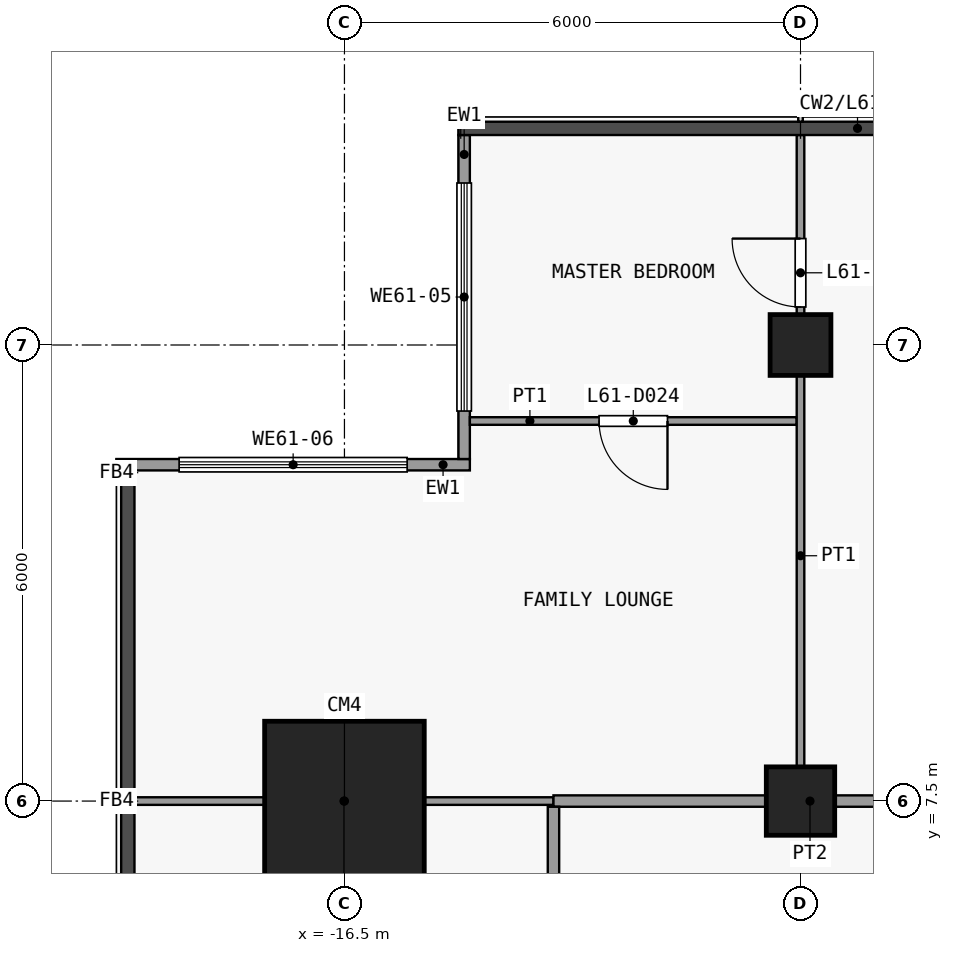
"""IFC4 building model, lengths in metres.
Left out: names, types, materials, properties, quantities, classifications, styles, units other than length and angle.
Written with IfcOpenShell. Run it as: python <this file> out.ifc"""

import sys

from ifc_helpers import new_model, si_unit, direction, frame, frame_2d, origin, origin_2d, place, context, subcontext, project, spatial, rectangle, extrude, element, fill, save


model = new_model("IFC4")
c1 = context("Model", 3, precision=1e-05, world=origin(), true_north=direction((0.0, 1.0)))
c2 = subcontext(c1, "Body", "Model", "MODEL_VIEW")
j1 = project(units=[si_unit("LENGTHUNIT", "METRE"), si_unit("PLANEANGLEUNIT", "RADIAN")], contexts=[c1])
p1 = place(None, origin())
s1 = spatial("IfcSite", under=j1, at=p1, CompositionType="ELEMENT")
p2 = place(p1, origin())
s2 = spatial("IfcBuilding", under=s1, at=p2, CompositionType="ELEMENT")
p3 = place(p2, frame((0.0, 0.0, 241.1)))
s3 = spatial("IfcBuildingStorey", under=s2, at=p3, CompositionType="ELEMENT", Elevation=241.1)
p4 = place(p3, frame((-16.5, 7.5, 0.0), z_axis=(0.0, 0.0, 1.0), x_axis=(1.0, 0.0, 0.0)))
e1 = element("IfcColumn", 1, at=p4, inside=s3, PredefinedType="COLUMN", context=c2, shape_type="SweptSolid", body=[
    extrude(rectangle(XDim=2.1, YDim=2.1, at=origin_2d()), origin(), (0.0, 0.0, 1.0), 3.6),
])
p5 = place(p3, frame((-10.5, 7.5, 0.0), z_axis=(0.0, 0.0, 1.0), x_axis=(1.0, 0.0, 0.0)))
e2 = element("IfcColumn", 2, at=p5, inside=s3, PredefinedType="COLUMN", context=c2, shape_type="SweptSolid", body=[
    extrude(rectangle(XDim=0.9, YDim=0.9, at=origin_2d()), origin(), (0.0, 0.0, 1.0), 3.6),
])
p6 = place(p3, frame((-10.5, 13.5, 0.0), z_axis=(0.0, 0.0, 1.0), x_axis=(1.0, 0.0, 0.0)))
e3 = element("IfcColumn", 3, at=p6, inside=s3, PredefinedType="COLUMN", context=c2, shape_type="SweptSolid", body=[
    extrude(rectangle(XDim=0.8, YDim=0.8, at=origin_2d()), origin(), (0.0, 0.0, 1.0), 3.6),
])
p7 = place(p3, frame((-14.925, 12.0, 0.0), z_axis=(0.0, 0.0, 1.0), x_axis=(0.0, 1.0, 0.0)))
e4 = element("IfcWall", 4, at=p7, inside=s3, PredefinedType="SOLIDWALL", context=c2, shape_type="SweptSolid", body=[
    extrude(rectangle(XDim=4.262, YDim=0.15, at=frame_2d((2.131, 0.0))), origin(), (0.0, 0.0, 1.0), 3.3),
])
p8 = place(p7, frame((0.631, 0.0, 0.9)))
e5 = element("IfcOpeningElement", 5, at=p8, cuts=e4, PredefinedType="OPENING", context=c2, shape_type="SweptSolid", body=[
    extrude(rectangle(XDim=3.0, YDim=2.4, at=frame_2d((1.5, 1.2))), frame((0.0, 0.085, 0.0), z_axis=(0.0, -1.0, 0.0), x_axis=(1.0, 0.0, 0.0)), (0.0, 0.0, 1.0), 0.17),
])
p9 = place(p3, frame((-19.5, 11.925, 0.0), z_axis=(0.0, 0.0, 1.0), x_axis=(1.0, 0.0, 0.0)))
e6 = element("IfcWall", 6, at=p9, inside=s3, PredefinedType="SOLIDWALL", context=c2, shape_type="SweptSolid", body=[
    extrude(rectangle(XDim=4.65, YDim=0.15, at=frame_2d((2.325, 0.0))), origin(), (0.0, 0.0, 1.0), 3.3),
])
p10 = place(p9, frame((0.825, 0.0, 0.9)))
e7 = element("IfcOpeningElement", 7, at=p10, cuts=e6, PredefinedType="OPENING", context=c2, shape_type="SweptSolid", body=[
    extrude(rectangle(XDim=3.0, YDim=2.4, at=frame_2d((1.5, 1.2))), frame((0.0, 0.085, 0.0), z_axis=(0.0, -1.0, 0.0), x_axis=(1.0, 0.0, 0.0)), (0.0, 0.0, 1.0), 0.17),
])
p11 = place(p3, frame((-19.262, 7.5, 0.0), z_axis=(0.0, 0.0, 1.0), x_axis=(1.0, 0.0, 0.0)))
e8 = element("IfcWall", 8, at=p11, inside=s3, PredefinedType="PARTITIONING", context=c2, shape_type="SweptSolid", body=[
    extrude(rectangle(XDim=5.512, YDim=0.1, at=frame_2d((2.756, 0.0))), origin(), (0.0, 0.0, 1.0), 3.3),
])
p12 = place(p3, frame((-13.75, 7.5, 0.0), z_axis=(0.0, 0.0, 1.0), x_axis=(1.0, 0.0, 0.0)))
e9 = element("IfcWall", 9, at=p12, inside=s3, PredefinedType="PARTITIONING", context=c2, shape_type="SweptSolid", body=[
    extrude(rectangle(XDim=6.75, YDim=0.15, at=frame_2d((3.375, 0.0))), origin(), (0.0, 0.0, 1.0), 3.3),
])
p13 = place(p3, frame((-14.85, 12.5, 0.0), z_axis=(0.0, 0.0, 1.0), x_axis=(1.0, 0.0, 0.0)))
e10 = element("IfcWall", 10, at=p13, inside=s3, PredefinedType="PARTITIONING", context=c2, shape_type="SweptSolid", body=[
    extrude(rectangle(XDim=4.3, YDim=0.1, at=frame_2d((2.15, 0.0))), origin(), (0.0, 0.0, 1.0), 3.3),
])
p14 = place(p13, frame((1.7, 0.0, 0.0)))
e11 = element("IfcOpeningElement", 11, at=p14, cuts=e10, PredefinedType="OPENING", context=c2, shape_type="SweptSolid", body=[
    extrude(rectangle(XDim=0.9, YDim=2.1, at=frame_2d((0.45, 1.05))), frame((0.0, 0.06, 0.0), z_axis=(0.0, -1.0, 0.0), x_axis=(1.0, 0.0, 0.0)), (0.0, 0.0, 1.0), 0.12),
])
p15 = place(p3, frame((-13.75, 4.6, 0.0), z_axis=(0.0, 0.0, 1.0), x_axis=(0.0, 1.0, 0.0)))
e12 = element("IfcWall", 12, at=p15, inside=s3, PredefinedType="PARTITIONING", context=c2, shape_type="SweptSolid", body=[
    extrude(rectangle(XDim=2.825, YDim=0.15, at=frame_2d((1.413, 0.0))), origin(), (0.0, 0.0, 1.0), 3.3),
])
p16 = place(p15, frame((1.0, 0.0, 0.0)))
e13 = element("IfcOpeningElement", 13, at=p16, cuts=e12, PredefinedType="OPENING", context=c2, shape_type="SweptSolid", body=[
    extrude(rectangle(XDim=0.9, YDim=2.1, at=frame_2d((0.45, 1.05))), frame((0.0, 0.085, 0.0), z_axis=(0.0, -1.0, 0.0), x_axis=(1.0, 0.0, 0.0)), (0.0, 0.0, 1.0), 0.17),
])
p17 = place(p3, frame((-10.5, 7.575, 0.0), z_axis=(0.0, 0.0, 1.0), x_axis=(0.0, 1.0, 0.0)))
e14 = element("IfcWall", 14, at=p17, inside=s3, PredefinedType="PARTITIONING", context=c2, shape_type="SweptSolid", body=[
    extrude(rectangle(XDim=8.688, YDim=0.1, at=frame_2d((4.344, 0.0))), origin(), (0.0, 0.0, 1.0), 3.3),
])
p18 = place(p17, frame((6.425, 0.0, 0.0)))
e15 = element("IfcOpeningElement", 15, at=p18, cuts=e14, PredefinedType="OPENING", context=c2, shape_type="SweptSolid", body=[
    extrude(rectangle(XDim=0.9, YDim=2.1, at=frame_2d((0.45, 1.05))), frame((0.0, 0.06, 0.0), z_axis=(0.0, -1.0, 0.0), x_axis=(1.0, 0.0, 0.0)), (0.0, 0.0, 1.0), 0.12),
])
p19 = place(p8, origin())
e16 = element("IfcWindow", 16, at=p19, inside=s3, PartitioningType="SINGLE_PANEL", PredefinedType="WINDOW", context=c2, shape_type="SweptSolid", body=[
    extrude(rectangle(XDim=3.0, YDim=2.4, at=frame_2d((1.5, 1.2))), frame((0.0, 0.03, 0.0), z_axis=(0.0, -1.0, 0.0), x_axis=(1.0, 0.0, 0.0)), (0.0, 0.0, 1.0), 0.06),
])
fill(e5, e16)
p20 = place(p10, origin())
e17 = element("IfcWindow", 17, at=p20, inside=s3, PartitioningType="SINGLE_PANEL", PredefinedType="WINDOW", context=c2, shape_type="SweptSolid", body=[
    extrude(rectangle(XDim=3.0, YDim=2.4, at=frame_2d((1.5, 1.2))), frame((0.0, 0.03, 0.0), z_axis=(0.0, -1.0, 0.0), x_axis=(1.0, 0.0, 0.0)), (0.0, 0.0, 1.0), 0.06),
])
fill(e7, e17)
p21 = place(p14, origin())
e18 = element("IfcDoor", 18, at=p21, inside=s3, OperationType="SINGLE_SWING_RIGHT", PredefinedType="DOOR", context=c2, shape_type="SweptSolid", body=[
    extrude(rectangle(XDim=0.9, YDim=2.1, at=frame_2d((0.45, 1.05))), frame((0.0, 0.025, 0.0), z_axis=(0.0, -1.0, 0.0), x_axis=(1.0, 0.0, 0.0)), (0.0, 0.0, 1.0), 0.05),
])
fill(e11, e18)
p22 = place(p18, origin())
e19 = element("IfcDoor", 19, at=p22, inside=s3, OperationType="SINGLE_SWING_LEFT", PredefinedType="DOOR", context=c2, shape_type="SweptSolid", body=[
    extrude(rectangle(XDim=0.9, YDim=2.1, at=frame_2d((0.45, 1.05))), frame((0.0, 0.025, 0.0), z_axis=(0.0, -1.0, 0.0), x_axis=(1.0, 0.0, 0.0)), (0.0, 0.0, 1.0), 0.05),
])
fill(e15, e19)
save(model, sys.argv[1])
